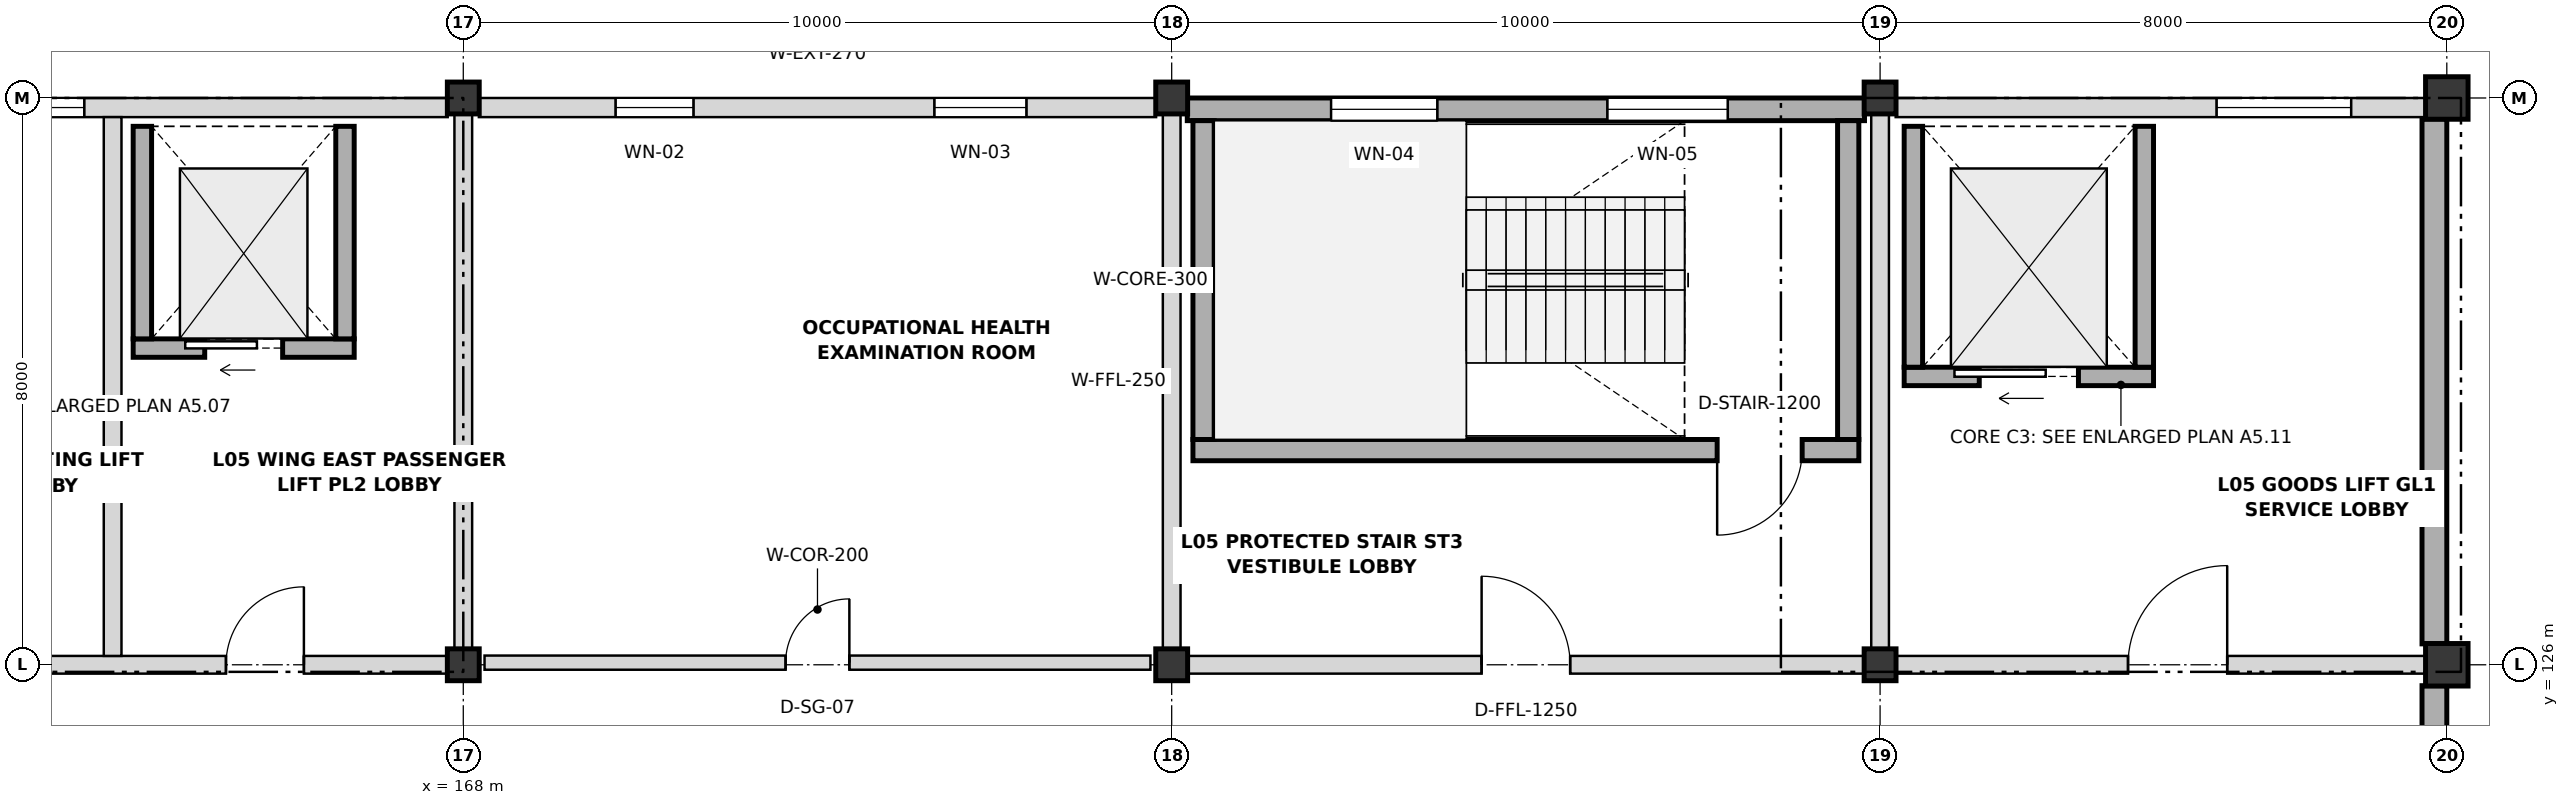
"""IFC4 building model, lengths in metres.
Left out: names, types, materials, properties, quantities, classifications, styles, units other than length and angle.
Written with IfcOpenShell. Run it as: python <this file> out.ifc"""

import sys

from ifc_helpers import new_model, si_unit, direction, frame, frame_2d, origin, origin_2d, place, context, subcontext, project, spatial, rectangle, extrude, element, fill, save


model = new_model("IFC4")
c1 = context("Model", 3, precision=1e-05, world=origin(), true_north=direction((0.0, 1.0)))
c2 = subcontext(c1, "Body", "Model", "MODEL_VIEW")
j1 = project(units=[si_unit("LENGTHUNIT", "METRE"), si_unit("PLANEANGLEUNIT", "RADIAN")], contexts=[c1])
p1 = place(None, origin())
s1 = spatial("IfcSite", under=j1, at=p1, CompositionType="ELEMENT")
p2 = place(p1, origin())
s2 = spatial("IfcBuilding", under=s1, at=p2, CompositionType="ELEMENT")
p3 = place(p2, frame((0.0, 0.0, 22.8)))
s3 = spatial("IfcBuildingStorey", under=s2, at=p3, CompositionType="ELEMENT", Elevation=22.8)
for number, where, z_axis, x_axis in (
    (1, (168.0, 126.0, 0.0), (0.0, 0.0, 1.0), (1.0, 0.0, 0.0)),
    (2, (168.0, 134.0, 0.0), (0.0, 0.0, 1.0), (1.0, 0.0, 0.0)),
    (3, (178.0, 126.0, 0.0), (0.0, 0.0, 1.0), (1.0, 0.0, 0.0)),
    (4, (178.0, 134.0, 0.0), (0.0, 0.0, 1.0), (1.0, 0.0, 0.0)),
    (5, (188.0, 126.0, 0.0), (0.0, 0.0, 1.0), (1.0, 0.0, 0.0)),
    (6, (188.0, 134.0, 0.0), (0.0, 0.0, 1.0), (1.0, 0.0, 0.0)),
):
    element("IfcColumn", number, at=place(p3, frame(where, z_axis=z_axis, x_axis=x_axis)), inside=s3, PredefinedType="COLUMN", context=c2, shape_type="SweptSolid", body=[
        extrude(rectangle(XDim=0.45, YDim=0.45, at=origin_2d()), origin(), (0.0, 0.0, 1.0), 4.2),
    ])
for number, where, z_axis, x_axis in (
    (7, (196.0, 126.0, 0.0), (0.0, 0.0, 1.0), (1.0, 0.0, 0.0)),
    (8, (196.0, 134.0, 0.0), (0.0, 0.0, 1.0), (1.0, 0.0, 0.0)),
):
    element("IfcColumn", number, at=place(p3, frame(where, z_axis=z_axis, x_axis=x_axis)), inside=s3, PredefinedType="COLUMN", context=c2, shape_type="SweptSolid", body=[
        extrude(rectangle(XDim=0.6, YDim=0.6, at=origin_2d()), origin(), (0.0, 0.0, 1.0), 4.2),
    ])
p4 = place(p3, frame((195.825, 125.705, 0.0), z_axis=(0.0, 0.0, 1.0), x_axis=(0.0, -1.0, 0.0)))
e9 = element("IfcWall", 9, at=p4, inside=s3, PredefinedType="SOLIDWALL", context=c2, shape_type="SweptSolid", body=[
    extrude(rectangle(XDim=11.41, YDim=0.35, at=frame_2d((5.705, 0.0))), origin(), (0.0, 0.0, 1.0), 4.2),
])
p5 = place(p3, frame((195.825, 133.705, 0.0), z_axis=(0.0, 0.0, 1.0), x_axis=(0.0, -1.0, 0.0)))
e10 = element("IfcWall", 10, at=p5, inside=s3, PredefinedType="SOLIDWALL", context=c2, shape_type="SweptSolid", body=[
    extrude(rectangle(XDim=7.41, YDim=0.35, at=frame_2d((3.705, 0.0))), origin(), (0.0, 0.0, 1.0), 4.2),
])
p6 = place(p3, frame((158.22, 133.865, 0.0), z_axis=(0.0, 0.0, 1.0), x_axis=(1.0, 0.0, 0.0)))
e11 = element("IfcWall", 11, at=p6, inside=s3, PredefinedType="SOLIDWALL", context=c2, shape_type="SweptSolid", body=[
    extrude(rectangle(XDim=9.56, YDim=0.27, at=frame_2d((4.78, 0.0))), origin(), (0.0, 0.0, 1.0), 3.188),
])
p7 = place(p6, frame((3.53, 0.0, 1.05)))
e12 = element("IfcOpeningElement", 12, at=p7, cuts=e11, PredefinedType="OPENING", context=c2, shape_type="SweptSolid", body=[
    extrude(rectangle(XDim=0.9, YDim=1.15, at=frame_2d((0.45, 0.575))), frame((0.0, 0.145, 0.0), z_axis=(0.0, -1.0, 0.0), x_axis=(1.0, 0.0, 0.0)), (0.0, 0.0, 1.0), 0.29),
])
p8 = place(p3, frame((168.22, 133.865, 0.0), z_axis=(0.0, 0.0, 1.0), x_axis=(1.0, 0.0, 0.0)))
e13 = element("IfcWall", 13, at=p8, inside=s3, PredefinedType="SOLIDWALL", context=c2, shape_type="SweptSolid", body=[
    extrude(rectangle(XDim=9.56, YDim=0.27, at=frame_2d((4.78, 0.0))), origin(), (0.0, 0.0, 1.0), 3.188),
])
p9 = place(p8, frame((1.93, 0.0, 1.05)))
e14 = element("IfcOpeningElement", 14, at=p9, cuts=e13, PredefinedType="OPENING", context=c2, shape_type="SweptSolid", body=[
    extrude(rectangle(XDim=1.1, YDim=1.15, at=frame_2d((0.55, 0.575))), frame((0.0, 0.145, 0.0), z_axis=(0.0, -1.0, 0.0), x_axis=(1.0, 0.0, 0.0)), (0.0, 0.0, 1.0), 0.29),
])
p10 = place(p8, frame((6.43, 0.0, 1.05)))
e15 = element("IfcOpeningElement", 15, at=p10, cuts=e13, PredefinedType="OPENING", context=c2, shape_type="SweptSolid", body=[
    extrude(rectangle(XDim=1.3, YDim=1.15, at=frame_2d((0.65, 0.575))), frame((0.0, 0.145, 0.0), z_axis=(0.0, -1.0, 0.0), x_axis=(1.0, 0.0, 0.0)), (0.0, 0.0, 1.0), 0.29),
])
p11 = place(p3, frame((178.22, 133.84, 0.0), z_axis=(0.0, 0.0, 1.0), x_axis=(1.0, 0.0, 0.0)))
e16 = element("IfcWall", 16, at=p11, inside=s3, PredefinedType="SHEAR", context=c2, shape_type="SweptSolid", body=[
    extrude(rectangle(XDim=9.56, YDim=0.32, at=frame_2d((4.78, 0.0))), origin(), (0.0, 0.0, 1.0), 4.2),
])
p12 = place(p11, frame((2.03, 0.0, 1.05)))
e17 = element("IfcOpeningElement", 17, at=p12, cuts=e16, PredefinedType="OPENING", context=c2, shape_type="SweptSolid", body=[
    extrude(rectangle(XDim=1.5, YDim=1.15, at=frame_2d((0.75, 0.575))), frame((0.0, 0.17, 0.0), z_axis=(0.0, -1.0, 0.0), x_axis=(1.0, 0.0, 0.0)), (0.0, 0.0, 1.0), 0.34),
])
p13 = place(p11, frame((5.93, 0.0, 1.05)))
e18 = element("IfcOpeningElement", 18, at=p13, cuts=e16, PredefinedType="OPENING", context=c2, shape_type="SweptSolid", body=[
    extrude(rectangle(XDim=1.7, YDim=1.15, at=frame_2d((0.85, 0.575))), frame((0.0, 0.17, 0.0), z_axis=(0.0, -1.0, 0.0), x_axis=(1.0, 0.0, 0.0)), (0.0, 0.0, 1.0), 0.34),
])
p14 = place(p3, frame((188.22, 133.865, 0.0), z_axis=(0.0, 0.0, 1.0), x_axis=(1.0, 0.0, 0.0)))
e19 = element("IfcWall", 19, at=p14, inside=s3, PredefinedType="SOLIDWALL", context=c2, shape_type="SweptSolid", body=[
    extrude(rectangle(XDim=7.485, YDim=0.27, at=frame_2d((3.743, 0.0))), origin(), (0.0, 0.0, 1.0), 3.188),
])
p15 = place(p14, frame((4.53, 0.0, 1.05)))
e20 = element("IfcOpeningElement", 20, at=p15, cuts=e19, PredefinedType="OPENING", context=c2, shape_type="SweptSolid", body=[
    extrude(rectangle(XDim=1.9, YDim=1.15, at=frame_2d((0.95, 0.575))), frame((0.0, 0.145, 0.0), z_axis=(0.0, -1.0, 0.0), x_axis=(1.0, 0.0, 0.0)), (0.0, 0.0, 1.0), 0.29),
])
p16 = place(p3, frame((187.7, 129.03, 0.0), z_axis=(0.0, 0.0, 1.0), x_axis=(-1.0, 0.0, 0.0)))
e21 = element("IfcWall", 21, at=p16, inside=s3, PredefinedType="SHEAR", context=c2, shape_type="SweptSolid", body=[
    extrude(rectangle(XDim=9.4, YDim=0.3, at=frame_2d((4.7, 0.0))), origin(), (0.0, 0.0, 1.0), 4.2),
])
p17 = place(p16, frame((0.8, 0.0, 0.0)))
e22 = element("IfcOpeningElement", 22, at=p17, cuts=e21, PredefinedType="OPENING", context=c2, shape_type="SweptSolid", body=[
    extrude(rectangle(XDim=1.2, YDim=2.15, at=frame_2d((0.6, 1.075))), frame((0.0, 0.16, 0.0), z_axis=(0.0, -1.0, 0.0), x_axis=(1.0, 0.0, 0.0)), (0.0, 0.0, 1.0), 0.32),
])
for number, where, z_axis, x_axis in (
    (23, (187.55, 133.68, 0.0), (0.0, 0.0, 1.0), (0.0, -1.0, 0.0)),
    (24, (178.45, 129.18, 0.0), (0.0, 0.0, 1.0), (0.0, 1.0, 0.0)),
):
    element("IfcWall", number, at=place(p3, frame(where, z_axis=z_axis, x_axis=x_axis)), inside=s3, PredefinedType="SHEAR", context=c2, shape_type="SweptSolid", body=[
        extrude(rectangle(XDim=4.5, YDim=0.3, at=frame_2d((2.25, 0.0))), origin(), (0.0, 0.0, 1.0), 4.2),
    ])
p18 = place(p3, frame((163.34, 130.47, 0.0), z_axis=(0.0, 0.0, 1.0), x_axis=(1.0, 0.0, 0.0)))
e25 = element("IfcWall", 25, at=p18, inside=s3, PredefinedType="SHEAR", context=c2, shape_type="SweptSolid", body=[
    extrude(rectangle(XDim=3.12, YDim=0.26, at=frame_2d((1.56, 0.0))), origin(), (0.0, 0.0, 1.0), 4.2),
])
p19 = place(p18, frame((1.01, 0.0, 0.0)))
e26 = element("IfcOpeningElement", 26, at=p19, cuts=e25, PredefinedType="OPENING", context=c2, shape_type="SweptSolid", body=[
    extrude(rectangle(XDim=1.1, YDim=2.15, at=frame_2d((0.55, 1.075))), frame((0.0, 0.14, 0.0), z_axis=(0.0, -1.0, 0.0), x_axis=(1.0, 0.0, 0.0)), (0.0, 0.0, 1.0), 0.28),
])
for number, where, z_axis, x_axis in (
    (27, (163.47, 130.6, 0.0), (0.0, 0.0, 1.0), (0.0, 1.0, 0.0)),
    (28, (166.33, 130.6, 0.0), (0.0, 0.0, 1.0), (0.0, 1.0, 0.0)),
):
    element("IfcWall", number, at=place(p3, frame(where, z_axis=z_axis, x_axis=x_axis)), inside=s3, PredefinedType="SHEAR", context=c2, shape_type="SweptSolid", body=[
        extrude(rectangle(XDim=3.0, YDim=0.26, at=frame_2d((1.5, 0.0))), origin(), (0.0, 0.0, 1.0), 4.2),
    ])
p20 = place(p3, frame((188.34, 130.07, 0.0), z_axis=(0.0, 0.0, 1.0), x_axis=(1.0, 0.0, 0.0)))
e29 = element("IfcWall", 29, at=p20, inside=s3, PredefinedType="SHEAR", context=c2, shape_type="SweptSolid", body=[
    extrude(rectangle(XDim=3.52, YDim=0.26, at=frame_2d((1.76, 0.0))), origin(), (0.0, 0.0, 1.0), 4.2),
])
p21 = place(p20, frame((1.06, 0.0, 0.0)))
e30 = element("IfcOpeningElement", 30, at=p21, cuts=e29, PredefinedType="OPENING", context=c2, shape_type="SweptSolid", body=[
    extrude(rectangle(XDim=1.4, YDim=2.2, at=frame_2d((0.7, 1.1))), frame((0.0, 0.14, 0.0), z_axis=(0.0, -1.0, 0.0), x_axis=(1.0, 0.0, 0.0)), (0.0, 0.0, 1.0), 0.28),
])
for number, where, z_axis, x_axis in (
    (31, (188.47, 130.2, 0.0), (0.0, 0.0, 1.0), (0.0, 1.0, 0.0)),
    (32, (191.73, 130.2, 0.0), (0.0, 0.0, 1.0), (0.0, 1.0, 0.0)),
):
    element("IfcWall", number, at=place(p3, frame(where, z_axis=z_axis, x_axis=x_axis)), inside=s3, PredefinedType="SHEAR", context=c2, shape_type="SweptSolid", body=[
        extrude(rectangle(XDim=3.4, YDim=0.26, at=frame_2d((1.7, 0.0))), origin(), (0.0, 0.0, 1.0), 4.2),
    ])
p22 = place(p3, frame((158.23, 126.0, 0.0), z_axis=(0.0, 0.0, 1.0), x_axis=(1.0, 0.0, 0.0)))
e33 = element("IfcWall", 33, at=p22, inside=s3, PredefinedType="PARTITIONING", context=c2, shape_type="SweptSolid", body=[
    extrude(rectangle(XDim=9.54, YDim=0.25, at=frame_2d((4.77, 0.0))), origin(), (0.0, 0.0, 1.0), 3.188),
])
p23 = place(p22, frame((1.945, 0.0, 0.0)))
e34 = element("IfcOpeningElement", 34, at=p23, cuts=e33, PredefinedType="OPENING", context=c2, shape_type="SweptSolid", body=[
    extrude(rectangle(XDim=1.25, YDim=2.15, at=frame_2d((0.625, 1.075))), frame((0.0, 0.135, 0.0), z_axis=(0.0, -1.0, 0.0), x_axis=(1.0, 0.0, 0.0)), (0.0, 0.0, 1.0), 0.27),
])
p24 = place(p22, frame((6.42, 0.0, 0.0)))
e35 = element("IfcOpeningElement", 35, at=p24, cuts=e33, PredefinedType="OPENING", context=c2, shape_type="SweptSolid", body=[
    extrude(rectangle(XDim=1.1, YDim=2.15, at=frame_2d((0.55, 1.075))), frame((0.0, 0.135, 0.0), z_axis=(0.0, -1.0, 0.0), x_axis=(1.0, 0.0, 0.0)), (0.0, 0.0, 1.0), 0.27),
])
p25 = place(p3, frame((178.23, 126.0, 0.0), z_axis=(0.0, 0.0, 1.0), x_axis=(1.0, 0.0, 0.0)))
e36 = element("IfcWall", 36, at=p25, inside=s3, PredefinedType="PARTITIONING", context=c2, shape_type="SweptSolid", body=[
    extrude(rectangle(XDim=9.54, YDim=0.25, at=frame_2d((4.77, 0.0))), origin(), (0.0, 0.0, 1.0), 3.188),
])
p26 = place(p25, frame((4.145, 0.0, 0.0)))
e37 = element("IfcOpeningElement", 37, at=p26, cuts=e36, PredefinedType="OPENING", context=c2, shape_type="SweptSolid", body=[
    extrude(rectangle(XDim=1.25, YDim=2.15, at=frame_2d((0.625, 1.075))), frame((0.0, 0.135, 0.0), z_axis=(0.0, -1.0, 0.0), x_axis=(1.0, 0.0, 0.0)), (0.0, 0.0, 1.0), 0.27),
])
p27 = place(p3, frame((188.23, 126.0, 0.0), z_axis=(0.0, 0.0, 1.0), x_axis=(1.0, 0.0, 0.0)))
e38 = element("IfcWall", 38, at=p27, inside=s3, PredefinedType="PARTITIONING", context=c2, shape_type="SweptSolid", body=[
    extrude(rectangle(XDim=7.465, YDim=0.25, at=frame_2d((3.732, 0.0))), origin(), (0.0, 0.0, 1.0), 3.188),
])
p28 = place(p27, frame((3.27, 0.0, 0.0)))
e39 = element("IfcOpeningElement", 39, at=p28, cuts=e38, PredefinedType="OPENING", context=c2, shape_type="SweptSolid", body=[
    extrude(rectangle(XDim=1.4, YDim=2.2, at=frame_2d((0.7, 1.1))), frame((0.0, 0.135, 0.0), z_axis=(0.0, -1.0, 0.0), x_axis=(1.0, 0.0, 0.0)), (0.0, 0.0, 1.0), 0.27),
])
p29 = place(p3, frame((163.05, 126.125, 0.0), z_axis=(0.0, 0.0, 1.0), x_axis=(0.0, 1.0, 0.0)))
e40 = element("IfcWall", 40, at=p29, inside=s3, PredefinedType="PARTITIONING", context=c2, shape_type="SweptSolid", body=[
    extrude(rectangle(XDim=7.605, YDim=0.25, at=frame_2d((3.802, 0.0))), origin(), (0.0, 0.0, 1.0), 3.188),
])
for number, where, z_axis, x_axis in (
    (41, (168.0, 126.23, 0.0), (0.0, 0.0, 1.0), (0.0, 1.0, 0.0)),
    (42, (178.0, 126.23, 0.0), (0.0, 0.0, 1.0), (0.0, 1.0, 0.0)),
    (43, (188.0, 126.23, 0.0), (0.0, 0.0, 1.0), (0.0, 1.0, 0.0)),
):
    element("IfcWall", number, at=place(p3, frame(where, z_axis=z_axis, x_axis=x_axis)), inside=s3, PredefinedType="PARTITIONING", context=c2, shape_type="SweptSolid", body=[
        extrude(rectangle(XDim=7.54, YDim=0.25, at=frame_2d((3.77, 0.0))), origin(), (0.0, 0.0, 1.0), 3.188),
    ])
p30 = place(p3, frame((168.3, 126.03, 0.0), z_axis=(0.0, 0.0, 1.0), x_axis=(1.0, 0.0, 0.0)))
e44 = element("IfcWall", 44, at=p30, inside=s3, PredefinedType="PARTITIONING", context=c2, shape_type="SweptSolid", body=[
    extrude(rectangle(XDim=9.4, YDim=0.2, at=frame_2d((4.7, 0.0))), origin(), (0.0, 0.0, 1.0), 3.188),
])
p31 = place(p30, frame((4.25, 0.0, 0.0)))
e45 = element("IfcOpeningElement", 45, at=p31, cuts=e44, PredefinedType="OPENING", context=c2, shape_type="SweptSolid", body=[
    extrude(rectangle(XDim=0.9, YDim=2.2, at=frame_2d((0.45, 1.1))), frame((0.0, 0.11, 0.0), z_axis=(0.0, -1.0, 0.0), x_axis=(1.0, 0.0, 0.0)), (0.0, 0.0, 1.0), 0.22),
])
p32 = place(p7, origin())
e46 = element("IfcWindow", 46, at=p32, inside=s3, PartitioningType="SINGLE_PANEL", PredefinedType="WINDOW", context=c2, shape_type="SweptSolid", body=[
    extrude(rectangle(XDim=0.9, YDim=1.15, at=frame_2d((0.45, 0.575))), frame((0.0, 0.03, 0.0), z_axis=(0.0, -1.0, 0.0), x_axis=(1.0, 0.0, 0.0)), (0.0, 0.0, 1.0), 0.06),
])
fill(e12, e46)
p33 = place(p9, origin())
e47 = element("IfcWindow", 47, at=p33, inside=s3, PartitioningType="SINGLE_PANEL", PredefinedType="WINDOW", context=c2, shape_type="SweptSolid", body=[
    extrude(rectangle(XDim=1.1, YDim=1.15, at=frame_2d((0.55, 0.575))), frame((0.0, 0.03, 0.0), z_axis=(0.0, -1.0, 0.0), x_axis=(1.0, 0.0, 0.0)), (0.0, 0.0, 1.0), 0.06),
])
fill(e14, e47)
p34 = place(p10, origin())
e48 = element("IfcWindow", 48, at=p34, inside=s3, PartitioningType="SINGLE_PANEL", PredefinedType="WINDOW", context=c2, shape_type="SweptSolid", body=[
    extrude(rectangle(XDim=1.3, YDim=1.15, at=frame_2d((0.65, 0.575))), frame((0.0, 0.03, 0.0), z_axis=(0.0, -1.0, 0.0), x_axis=(1.0, 0.0, 0.0)), (0.0, 0.0, 1.0), 0.06),
])
fill(e15, e48)
p35 = place(p12, origin())
e49 = element("IfcWindow", 49, at=p35, inside=s3, PartitioningType="SINGLE_PANEL", PredefinedType="WINDOW", context=c2, shape_type="SweptSolid", body=[
    extrude(rectangle(XDim=1.5, YDim=1.15, at=frame_2d((0.75, 0.575))), frame((0.0, 0.03, 0.0), z_axis=(0.0, -1.0, 0.0), x_axis=(1.0, 0.0, 0.0)), (0.0, 0.0, 1.0), 0.06),
])
fill(e17, e49)
p36 = place(p13, origin())
e50 = element("IfcWindow", 50, at=p36, inside=s3, PartitioningType="SINGLE_PANEL", PredefinedType="WINDOW", context=c2, shape_type="SweptSolid", body=[
    extrude(rectangle(XDim=1.7, YDim=1.15, at=frame_2d((0.85, 0.575))), frame((0.0, 0.03, 0.0), z_axis=(0.0, -1.0, 0.0), x_axis=(1.0, 0.0, 0.0)), (0.0, 0.0, 1.0), 0.06),
])
fill(e18, e50)
p37 = place(p15, origin())
e51 = element("IfcWindow", 51, at=p37, inside=s3, PartitioningType="SINGLE_PANEL", PredefinedType="WINDOW", context=c2, shape_type="SweptSolid", body=[
    extrude(rectangle(XDim=1.9, YDim=1.15, at=frame_2d((0.95, 0.575))), frame((0.0, 0.03, 0.0), z_axis=(0.0, -1.0, 0.0), x_axis=(1.0, 0.0, 0.0)), (0.0, 0.0, 1.0), 0.06),
])
fill(e20, e51)
p38 = place(p17, origin())
e52 = element("IfcDoor", 52, at=p38, inside=s3, OperationType="SINGLE_SWING_RIGHT", PredefinedType="DOOR", context=c2, shape_type="SweptSolid", body=[
    extrude(rectangle(XDim=1.2, YDim=2.15, at=frame_2d((0.6, 1.075))), frame((0.0, 0.025, 0.0), z_axis=(0.0, -1.0, 0.0), x_axis=(1.0, 0.0, 0.0)), (0.0, 0.0, 1.0), 0.05),
])
fill(e22, e52)
p39 = place(p19, origin())
e53 = element("IfcDoor", 53, at=p39, inside=s3, OperationType="SLIDING_TO_LEFT", PredefinedType="DOOR", context=c2, shape_type="SweptSolid", body=[
    extrude(rectangle(XDim=1.1, YDim=2.15, at=frame_2d((0.55, 1.075))), frame((0.0, 0.025, 0.0), z_axis=(0.0, -1.0, 0.0), x_axis=(1.0, 0.0, 0.0)), (0.0, 0.0, 1.0), 0.05),
])
fill(e26, e53)
p40 = place(p21, origin())
e54 = element("IfcDoor", 54, at=p40, inside=s3, OperationType="SLIDING_TO_LEFT", PredefinedType="DOOR", context=c2, shape_type="SweptSolid", body=[
    extrude(rectangle(XDim=1.4, YDim=2.2, at=frame_2d((0.7, 1.1))), frame((0.0, 0.025, 0.0), z_axis=(0.0, -1.0, 0.0), x_axis=(1.0, 0.0, 0.0)), (0.0, 0.0, 1.0), 0.05),
])
fill(e30, e54)
p41 = place(p24, origin())
e55 = element("IfcDoor", 55, at=p41, inside=s3, OperationType="SINGLE_SWING_RIGHT", PredefinedType="DOOR", context=c2, shape_type="SweptSolid", body=[
    extrude(rectangle(XDim=1.1, YDim=2.15, at=frame_2d((0.55, 1.075))), frame((0.0, 0.025, 0.0), z_axis=(0.0, -1.0, 0.0), x_axis=(1.0, 0.0, 0.0)), (0.0, 0.0, 1.0), 0.05),
])
fill(e35, e55)
p42 = place(p26, origin())
e56 = element("IfcDoor", 56, at=p42, inside=s3, OperationType="SINGLE_SWING_LEFT", PredefinedType="DOOR", context=c2, shape_type="SweptSolid", body=[
    extrude(rectangle(XDim=1.25, YDim=2.15, at=frame_2d((0.625, 1.075))), frame((0.0, 0.025, 0.0), z_axis=(0.0, -1.0, 0.0), x_axis=(1.0, 0.0, 0.0)), (0.0, 0.0, 1.0), 0.05),
])
fill(e37, e56)
p43 = place(p28, origin())
e57 = element("IfcDoor", 57, at=p43, inside=s3, OperationType="SINGLE_SWING_RIGHT", PredefinedType="DOOR", context=c2, shape_type="SweptSolid", body=[
    extrude(rectangle(XDim=1.4, YDim=2.2, at=frame_2d((0.7, 1.1))), frame((0.0, 0.025, 0.0), z_axis=(0.0, -1.0, 0.0), x_axis=(1.0, 0.0, 0.0)), (0.0, 0.0, 1.0), 0.05),
])
fill(e39, e57)
p44 = place(p31, origin())
e58 = element("IfcDoor", 58, at=p44, inside=s3, OperationType="SINGLE_SWING_RIGHT", PredefinedType="DOOR", context=c2, shape_type="SweptSolid", body=[
    extrude(rectangle(XDim=0.9, YDim=2.2, at=frame_2d((0.45, 1.1))), frame((0.0, 0.025, 0.0), z_axis=(0.0, -1.0, 0.0), x_axis=(1.0, 0.0, 0.0)), (0.0, 0.0, 1.0), 0.05),
])
fill(e45, e58)
save(model, sys.argv[1])
